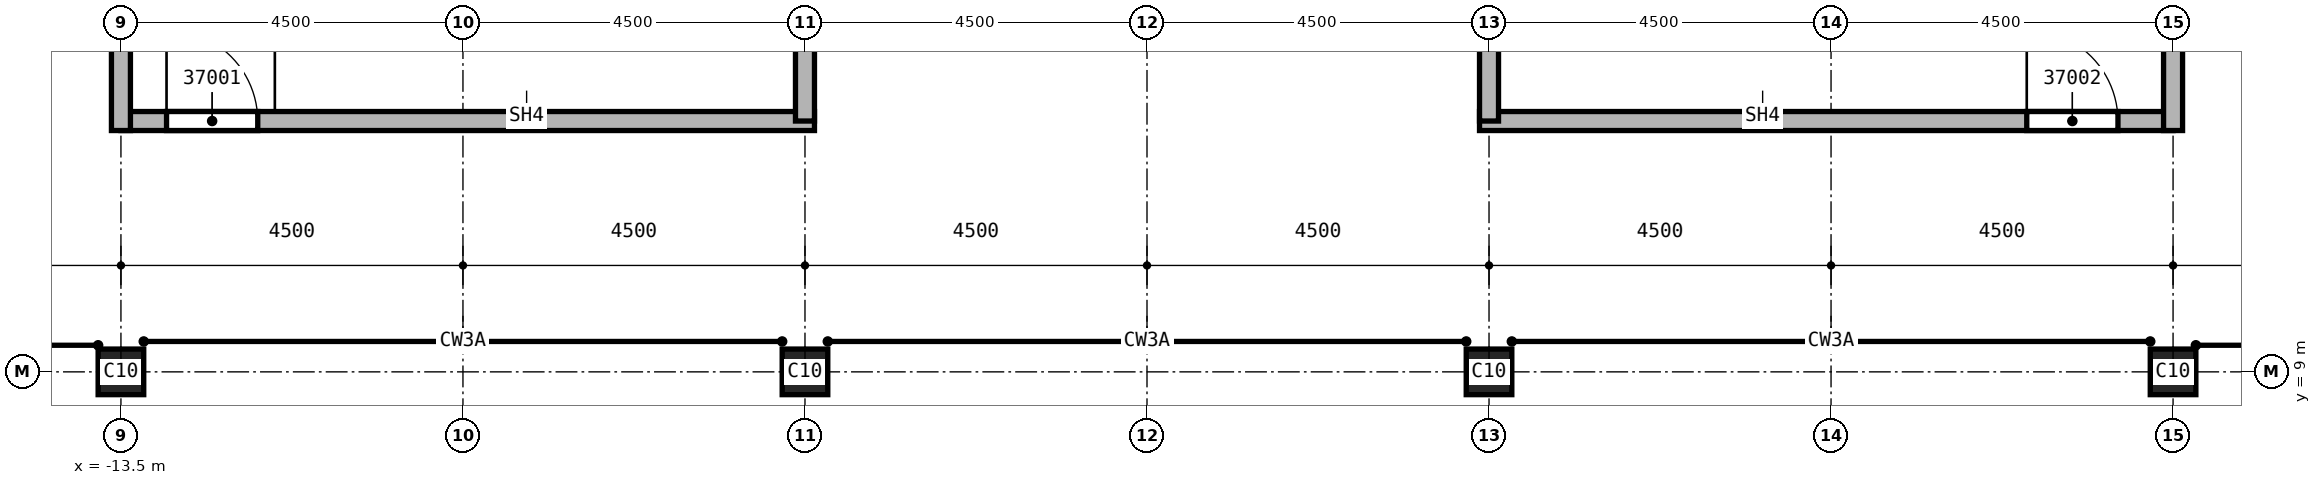
"""IFC4 building model, lengths in metres.
Left out: names, types, materials, properties, quantities, classifications, styles, units other than length and angle.
Written with IfcOpenShell. Run it as: python <this file> out.ifc"""

import sys

from ifc_helpers import new_model, si_unit, direction, frame, frame_2d, origin, origin_2d, place, context, subcontext, project, spatial, rectangle, extrude, element, fill, save


model = new_model("IFC4")
c1 = context("Model", 3, precision=1e-05, world=origin(), true_north=direction((0.0, 1.0)))
c2 = subcontext(c1, "Body", "Model", "MODEL_VIEW")
j1 = project(units=[si_unit("LENGTHUNIT", "METRE"), si_unit("PLANEANGLEUNIT", "RADIAN")], contexts=[c1])
p1 = place(None, origin())
s1 = spatial("IfcSite", under=j1, at=p1, CompositionType="ELEMENT")
p2 = place(p1, origin())
s2 = spatial("IfcBuilding", under=s1, at=p2, CompositionType="ELEMENT")
p3 = place(p2, frame((0.0, 0.0, 386.0)))
s3 = spatial("IfcBuildingStorey", under=s2, at=p3, CompositionType="ELEMENT", Elevation=386.0)
for number, where, z_axis, x_axis in (
    (1, (4.5, 9.0, 0.0), (0.0, 0.0, 1.0), (1.0, 0.0, 0.0)),
    (2, (13.5, 9.0, 0.0), (0.0, 0.0, 1.0), (1.0, 0.0, 0.0)),
    (3, (-4.5, 9.0, 0.0), (0.0, 0.0, 1.0), (1.0, 0.0, 0.0)),
    (4, (-13.5, 9.0, 0.0), (0.0, 0.0, 1.0), (1.0, 0.0, 0.0)),
):
    element("IfcColumn", number, at=place(p3, frame(where, z_axis=z_axis, x_axis=x_axis)), inside=s3, PredefinedType="COLUMN", context=c2, shape_type="SweptSolid", body=[
        extrude(rectangle(XDim=0.6, YDim=0.6, at=origin_2d()), origin(), (0.0, 0.0, 1.0), 2.113),
    ])
p4 = place(p3, frame((-13.5, 12.3, 0.0), z_axis=(0.0, 0.0, 1.0), x_axis=(1.0, 0.0, 0.0)))
e5 = element("IfcWall", 5, at=p4, inside=s3, PredefinedType="SOLIDWALL", context=c2, shape_type="SweptSolid", body=[
    extrude(rectangle(XDim=9.125, YDim=0.25, at=frame_2d((4.562, 0.0))), origin(), (0.0, 0.0, 1.0), 2.953),
])
p5 = place(p4, frame((0.6, 0.0, 0.0)))
e6 = element("IfcOpeningElement", 6, at=p5, cuts=e5, PredefinedType="OPENING", context=c2, shape_type="SweptSolid", body=[
    extrude(rectangle(XDim=1.2, YDim=2.1, at=frame_2d((0.6, 1.05))), frame((0.0, 0.125, 0.0), z_axis=(0.0, -1.0, 0.0), x_axis=(1.0, 0.0, 0.0)), (0.0, 0.0, 1.0), 0.25),
])
p6 = place(p3, frame((-13.5, 12.175, 0.0), z_axis=(0.0, 0.0, 1.0), x_axis=(0.0, 1.0, 0.0)))
e7 = element("IfcWall", 7, at=p6, inside=s3, PredefinedType="SOLIDWALL", context=c2, shape_type="SweptSolid", body=[
    extrude(rectangle(XDim=4.75, YDim=0.25, at=frame_2d((2.375, 0.0))), origin(), (0.0, 0.0, 1.0), 2.953),
])
p7 = place(p3, frame((-4.5, 16.925, 0.0), z_axis=(0.0, 0.0, 1.0), x_axis=(0.0, -1.0, 0.0)))
e8 = element("IfcWall", 8, at=p7, inside=s3, PredefinedType="SOLIDWALL", context=c2, shape_type="SweptSolid", body=[
    extrude(rectangle(XDim=4.625, YDim=0.25, at=frame_2d((2.312, 0.0))), origin(), (0.0, 0.0, 1.0), 4.281),
])
p8 = place(p3, frame((4.375, 12.3, 0.0), z_axis=(0.0, 0.0, 1.0), x_axis=(1.0, 0.0, 0.0)))
e9 = element("IfcWall", 9, at=p8, inside=s3, PredefinedType="SOLIDWALL", context=c2, shape_type="SweptSolid", body=[
    extrude(rectangle(XDim=9.125, YDim=0.25, at=frame_2d((4.562, 0.0))), origin(), (0.0, 0.0, 1.0), 2.953),
])
p9 = place(p8, frame((7.2, 0.0, 0.0)))
e10 = element("IfcOpeningElement", 10, at=p9, cuts=e9, PredefinedType="OPENING", context=c2, shape_type="SweptSolid", body=[
    extrude(rectangle(XDim=1.2, YDim=2.1, at=frame_2d((0.6, 1.05))), frame((0.0, 0.125, 0.0), z_axis=(0.0, -1.0, 0.0), x_axis=(1.0, 0.0, 0.0)), (0.0, 0.0, 1.0), 0.25),
])
p10 = place(p3, frame((4.5, 12.3, 0.0), z_axis=(0.0, 0.0, 1.0), x_axis=(0.0, 1.0, 0.0)))
e11 = element("IfcWall", 11, at=p10, inside=s3, PredefinedType="SOLIDWALL", context=c2, shape_type="SweptSolid", body=[
    extrude(rectangle(XDim=4.625, YDim=0.25, at=frame_2d((2.312, 0.0))), origin(), (0.0, 0.0, 1.0), 4.281),
])
p11 = place(p3, frame((13.5, 12.175, 0.0), z_axis=(0.0, 0.0, 1.0), x_axis=(0.0, 1.0, 0.0)))
e12 = element("IfcWall", 12, at=p11, inside=s3, PredefinedType="SOLIDWALL", context=c2, shape_type="SweptSolid", body=[
    extrude(rectangle(XDim=4.75, YDim=0.25, at=frame_2d((2.375, 0.0))), origin(), (0.0, 0.0, 1.0), 2.953),
])
p12 = place(p5, origin())
e13 = element("IfcDoor", 13, at=p12, inside=s3, OperationType="SINGLE_SWING_RIGHT", PredefinedType="DOOR", context=c2, shape_type="SweptSolid", body=[
    extrude(rectangle(XDim=1.2, YDim=2.1, at=frame_2d((0.6, 1.05))), frame((0.0, 0.025, 0.0), z_axis=(0.0, -1.0, 0.0), x_axis=(1.0, 0.0, 0.0)), (0.0, 0.0, 1.0), 0.05),
])
fill(e6, e13)
p13 = place(p9, origin())
e14 = element("IfcDoor", 14, at=p13, inside=s3, OperationType="SINGLE_SWING_LEFT", PredefinedType="DOOR", context=c2, shape_type="SweptSolid", body=[
    extrude(rectangle(XDim=1.2, YDim=2.1, at=frame_2d((0.6, 1.05))), frame((0.0, 0.025, 0.0), z_axis=(0.0, -1.0, 0.0), x_axis=(1.0, 0.0, 0.0)), (0.0, 0.0, 1.0), 0.05),
])
fill(e10, e14)
save(model, sys.argv[1])
